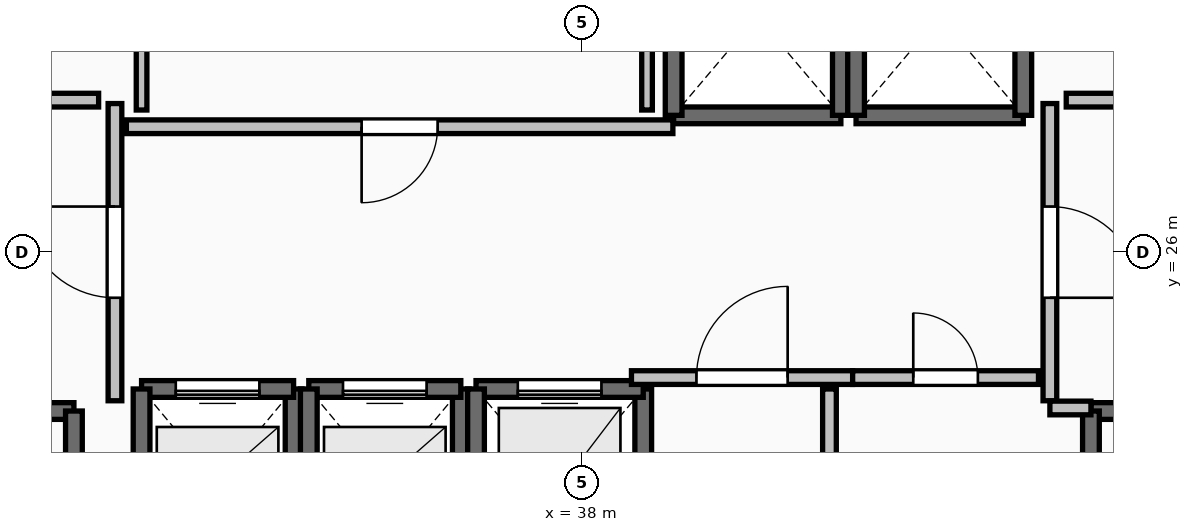
"""IFC4 building model, lengths in metres.
Left out: names, types, materials, properties, quantities, classifications, styles, units other than length and angle.
Written with IfcOpenShell. Run it as: python <this file> out.ifc"""

import sys

from ifc_helpers import new_model, si_unit, direction, frame, frame_2d, origin, place, context, subcontext, project, spatial, rectangle, extrude, element, fill, save


model = new_model("IFC4")
c1 = context("Model", 3, precision=1e-05, world=origin(), true_north=direction((0.0, 1.0)))
c2 = subcontext(c1, "Body", "Model", "MODEL_VIEW")
j1 = project(units=[si_unit("LENGTHUNIT", "METRE"), si_unit("PLANEANGLEUNIT", "RADIAN")], contexts=[c1])
p1 = place(None, origin())
s1 = spatial("IfcSite", under=j1, at=p1, CompositionType="ELEMENT")
p2 = place(p1, origin())
s2 = spatial("IfcBuilding", under=s1, at=p2, CompositionType="ELEMENT")
p3 = place(p2, frame((0.0, 0.0, 136.1)))
s3 = spatial("IfcBuildingStorey", under=s2, at=p3, CompositionType="ELEMENT", Elevation=136.1)
p4 = place(p3, frame((27.94, 23.91, 0.0), z_axis=(0.0, 0.0, 1.0), x_axis=(1.0, 0.0, 0.0)))
e1 = element("IfcWall", 1, at=p4, inside=s3, PredefinedType="SOLIDWALL", context=c2, shape_type="SweptSolid", body=[
    extrude(rectangle(XDim=3.37, YDim=0.22, at=frame_2d((1.685, 0.0))), origin(), (0.0, 0.0, 1.0), 3.24),
])
p5 = place(p4, frame((1.135, 0.0, 0.0)))
e2 = element("IfcOpeningElement", 2, at=p5, cuts=e1, PredefinedType="OPENING", context=c2, shape_type="SweptSolid", body=[
    extrude(rectangle(XDim=1.1, YDim=2.15, at=frame_2d((0.55, 1.075))), frame((0.0, 0.125, 0.0), z_axis=(0.0, -1.0, 0.0), x_axis=(1.0, 0.0, 0.0)), (0.0, 0.0, 1.0), 0.25),
])
p6 = place(p3, frame((31.31, 23.91, 0.0), z_axis=(0.0, 0.0, 1.0), x_axis=(0.0, -1.0, 0.0)))
e3 = element("IfcWall", 3, at=p6, inside=s3, PredefinedType="SOLIDWALL", context=c2, shape_type="SweptSolid", body=[
    extrude(rectangle(XDim=7.42, YDim=0.22, at=frame_2d((3.71, 0.0))), origin(), (0.0, 0.0, 1.0), 3.24),
])
p7 = place(p3, frame((44.69, 23.91, 0.0), z_axis=(0.0, 0.0, 1.0), x_axis=(1.0, 0.0, 0.0)))
e4 = element("IfcWall", 4, at=p7, inside=s3, PredefinedType="SOLIDWALL", context=c2, shape_type="SweptSolid", body=[
    extrude(rectangle(XDim=3.37, YDim=0.22, at=frame_2d((1.685, 0.0))), origin(), (0.0, 0.0, 1.0), 3.24),
])
p8 = place(p7, frame((1.135, 0.0, 0.0)))
e5 = element("IfcOpeningElement", 5, at=p8, cuts=e4, PredefinedType="OPENING", context=c2, shape_type="SweptSolid", body=[
    extrude(rectangle(XDim=1.1, YDim=2.15, at=frame_2d((0.55, 1.075))), frame((0.0, 0.125, 0.0), z_axis=(0.0, -1.0, 0.0), x_axis=(1.0, 0.0, 0.0)), (0.0, 0.0, 1.0), 0.25),
])
p9 = place(p3, frame((44.69, 16.49, 0.0), z_axis=(0.0, 0.0, 1.0), x_axis=(0.0, 1.0, 0.0)))
e6 = element("IfcWall", 6, at=p9, inside=s3, PredefinedType="SOLIDWALL", context=c2, shape_type="SweptSolid", body=[
    extrude(rectangle(XDim=7.42, YDim=0.22, at=frame_2d((3.71, 0.0))), origin(), (0.0, 0.0, 1.0), 3.24),
])
p10 = place(p3, frame((34.2, 21.8, 0.0), z_axis=(0.0, 0.0, 1.0), x_axis=(0.0, 1.0, 0.0)))
e7 = element("IfcWall", 7, at=p10, inside=s3, PredefinedType="SOLIDWALL", context=c2, shape_type="SweptSolid", body=[
    extrude(rectangle(XDim=2.4, YDim=0.22, at=frame_2d((1.2, 0.0))), origin(), (0.0, 0.0, 1.0), 3.24),
])
p11 = place(p3, frame((34.2, 24.2, 0.0), z_axis=(0.0, 0.0, 1.0), x_axis=(-1.0, 0.0, 0.0)))
e8 = element("IfcWall", 8, at=p11, inside=s3, PredefinedType="SOLIDWALL", context=c2, shape_type="SweptSolid", body=[
    extrude(rectangle(XDim=2.0, YDim=0.22, at=frame_2d((1.0, 0.0))), origin(), (0.0, 0.0, 1.0), 3.24),
])
p12 = place(p11, frame((0.45, 0.0, 0.0)))
e9 = element("IfcOpeningElement", 9, at=p12, cuts=e8, PredefinedType="OPENING", context=c2, shape_type="SweptSolid", body=[
    extrude(rectangle(XDim=1.1, YDim=2.2, at=frame_2d((0.55, 1.1))), frame((0.0, 0.125, 0.0), z_axis=(0.0, -1.0, 0.0), x_axis=(1.0, 0.0, 0.0)), (0.0, 0.0, 1.0), 0.25),
])
for number, where, z_axis, x_axis in (
    (10, (32.2, 24.2, 0.0), (0.0, 0.0, 1.0), (0.0, -1.0, 0.0)),
    (11, (36.4, 21.8, 0.0), (0.0, 0.0, 1.0), (0.0, 1.0, 0.0)),
):
    element("IfcWall", number, at=place(p3, frame(where, z_axis=z_axis, x_axis=x_axis)), inside=s3, PredefinedType="SOLIDWALL", context=c2, shape_type="SweptSolid", body=[
        extrude(rectangle(XDim=2.4, YDim=0.22, at=frame_2d((1.2, 0.0))), origin(), (0.0, 0.0, 1.0), 3.24),
    ])
p13 = place(p3, frame((36.4, 24.2, 0.0), z_axis=(0.0, 0.0, 1.0), x_axis=(-1.0, 0.0, 0.0)))
e12 = element("IfcWall", 12, at=p13, inside=s3, PredefinedType="SOLIDWALL", context=c2, shape_type="SweptSolid", body=[
    extrude(rectangle(XDim=2.0, YDim=0.22, at=frame_2d((1.0, 0.0))), origin(), (0.0, 0.0, 1.0), 3.24),
])
p14 = place(p13, frame((0.45, 0.0, 0.0)))
e13 = element("IfcOpeningElement", 13, at=p14, cuts=e12, PredefinedType="OPENING", context=c2, shape_type="SweptSolid", body=[
    extrude(rectangle(XDim=1.1, YDim=2.2, at=frame_2d((0.55, 1.1))), frame((0.0, 0.125, 0.0), z_axis=(0.0, -1.0, 0.0), x_axis=(1.0, 0.0, 0.0)), (0.0, 0.0, 1.0), 0.25),
])
p15 = place(p3, frame((34.4, 24.2, 0.0), z_axis=(0.0, 0.0, 1.0), x_axis=(0.0, -1.0, 0.0)))
e14 = element("IfcWall", 14, at=p15, inside=s3, PredefinedType="SOLIDWALL", context=c2, shape_type="SweptSolid", body=[
    extrude(rectangle(XDim=2.4, YDim=0.22, at=frame_2d((1.2, 0.0))), origin(), (0.0, 0.0, 1.0), 3.24),
])
p16 = place(p3, frame((38.8, 21.6, 0.0), z_axis=(0.0, 0.0, 1.0), x_axis=(0.0, 1.0, 0.0)))
e15 = element("IfcWall", 15, at=p16, inside=s3, PredefinedType="SOLIDWALL", context=c2, shape_type="SweptSolid", body=[
    extrude(rectangle(XDim=2.6, YDim=0.22, at=frame_2d((1.3, 0.0))), origin(), (0.0, 0.0, 1.0), 3.24),
])
p17 = place(p3, frame((38.8, 24.2, 0.0), z_axis=(0.0, 0.0, 1.0), x_axis=(-1.0, 0.0, 0.0)))
e16 = element("IfcWall", 16, at=p17, inside=s3, PredefinedType="SOLIDWALL", context=c2, shape_type="SweptSolid", body=[
    extrude(rectangle(XDim=2.2, YDim=0.22, at=frame_2d((1.1, 0.0))), origin(), (0.0, 0.0, 1.0), 3.24),
])
p18 = place(p17, frame((0.55, 0.0, 0.0)))
e17 = element("IfcOpeningElement", 17, at=p18, cuts=e16, PredefinedType="OPENING", context=c2, shape_type="SweptSolid", body=[
    extrude(rectangle(XDim=1.1, YDim=2.2, at=frame_2d((0.55, 1.1))), frame((0.0, 0.125, 0.0), z_axis=(0.0, -1.0, 0.0), x_axis=(1.0, 0.0, 0.0)), (0.0, 0.0, 1.0), 0.25),
])
p19 = place(p3, frame((36.6, 24.2, 0.0), z_axis=(0.0, 0.0, 1.0), x_axis=(0.0, -1.0, 0.0)))
e18 = element("IfcWall", 18, at=p19, inside=s3, PredefinedType="SOLIDWALL", context=c2, shape_type="SweptSolid", body=[
    extrude(rectangle(XDim=2.6, YDim=0.22, at=frame_2d((1.3, 0.0))), origin(), (0.0, 0.0, 1.0), 3.24),
])
p20 = place(p3, frame((39.2, 27.8, 0.0), z_axis=(0.0, 0.0, 1.0), x_axis=(1.0, 0.0, 0.0)))
e19 = element("IfcWall", 19, at=p20, inside=s3, PredefinedType="SOLIDWALL", context=c2, shape_type="SweptSolid", body=[
    extrude(rectangle(XDim=2.2, YDim=0.22, at=frame_2d((1.1, 0.0))), origin(), (0.0, 0.0, 1.0), 3.24),
])
for number, where, z_axis, x_axis in (
    (20, (41.4, 27.8, 0.0), (0.0, 0.0, 1.0), (0.0, 1.0, 0.0)),
    (21, (39.2, 30.4, 0.0), (0.0, 0.0, 1.0), (0.0, -1.0, 0.0)),
):
    element("IfcWall", number, at=place(p3, frame(where, z_axis=z_axis, x_axis=x_axis)), inside=s3, PredefinedType="SOLIDWALL", context=c2, shape_type="SweptSolid", body=[
        extrude(rectangle(XDim=2.6, YDim=0.22, at=frame_2d((1.3, 0.0))), origin(), (0.0, 0.0, 1.0), 3.24),
    ])
p21 = place(p3, frame((41.6, 27.8, 0.0), z_axis=(0.0, 0.0, 1.0), x_axis=(1.0, 0.0, 0.0)))
e22 = element("IfcWall", 22, at=p21, inside=s3, PredefinedType="SOLIDWALL", context=c2, shape_type="SweptSolid", body=[
    extrude(rectangle(XDim=2.2, YDim=0.22, at=frame_2d((1.1, 0.0))), origin(), (0.0, 0.0, 1.0), 3.24),
])
for number, where, z_axis, x_axis in (
    (23, (43.8, 27.8, 0.0), (0.0, 0.0, 1.0), (0.0, 1.0, 0.0)),
    (24, (41.6, 30.4, 0.0), (0.0, 0.0, 1.0), (0.0, -1.0, 0.0)),
):
    element("IfcWall", number, at=place(p3, frame(where, z_axis=z_axis, x_axis=x_axis)), inside=s3, PredefinedType="SOLIDWALL", context=c2, shape_type="SweptSolid", body=[
        extrude(rectangle(XDim=2.6, YDim=0.22, at=frame_2d((1.3, 0.0))), origin(), (0.0, 0.0, 1.0), 3.24),
    ])
p22 = place(p3, frame((31.85, 24.045, 0.0), z_axis=(0.0, 0.0, 1.0), x_axis=(0.0, 1.0, 0.0)))
e25 = element("IfcWall", 25, at=p22, inside=s3, PredefinedType="PARTITIONING", context=c2, shape_type="SweptSolid", body=[
    extrude(rectangle(XDim=3.91, YDim=0.18, at=frame_2d((1.955, 0.0))), origin(), (0.0, 0.0, 1.0), 3.24),
])
p23 = place(p22, frame((1.355, 0.0, 0.0)))
e26 = element("IfcOpeningElement", 26, at=p23, cuts=e25, PredefinedType="OPENING", context=c2, shape_type="SweptSolid", body=[
    extrude(rectangle(XDim=1.2, YDim=2.15, at=frame_2d((0.6, 1.075))), frame((0.0, 0.105, 0.0), z_axis=(0.0, -1.0, 0.0), x_axis=(1.0, 0.0, 0.0)), (0.0, 0.0, 1.0), 0.21),
])
p24 = place(p3, frame((44.15, 27.955, 0.0), z_axis=(0.0, 0.0, 1.0), x_axis=(0.0, -1.0, 0.0)))
e27 = element("IfcWall", 27, at=p24, inside=s3, PredefinedType="PARTITIONING", context=c2, shape_type="SweptSolid", body=[
    extrude(rectangle(XDim=3.91, YDim=0.18, at=frame_2d((1.955, 0.0))), origin(), (0.0, 0.0, 1.0), 3.24),
])
p25 = place(p24, frame((1.355, 0.0, 0.0)))
e28 = element("IfcOpeningElement", 28, at=p25, cuts=e27, PredefinedType="OPENING", context=c2, shape_type="SweptSolid", body=[
    extrude(rectangle(XDim=1.2, YDim=2.15, at=frame_2d((0.6, 1.075))), frame((0.0, 0.105, 0.0), z_axis=(0.0, -1.0, 0.0), x_axis=(1.0, 0.0, 0.0)), (0.0, 0.0, 1.0), 0.21),
])
p26 = place(p3, frame((44.15, 23.95, 0.0), z_axis=(0.0, 0.0, 1.0), x_axis=(1.0, 0.0, 0.0)))
e29 = element("IfcWall", 29, at=p26, inside=s3, PredefinedType="PARTITIONING", context=c2, shape_type="SweptSolid", body=[
    extrude(rectangle(XDim=0.54, YDim=0.18, at=frame_2d((0.27, 0.0))), origin(), (0.0, 0.0, 1.0), 3.24),
])
p27 = place(p3, frame((38.645, 24.35, 0.0), z_axis=(0.0, 0.0, 1.0), x_axis=(1.0, 0.0, 0.0)))
e30 = element("IfcWall", 30, at=p27, inside=s3, PredefinedType="PARTITIONING", context=c2, shape_type="SweptSolid", body=[
    extrude(rectangle(XDim=2.91, YDim=0.18, at=frame_2d((1.455, 0.0))), origin(), (0.0, 0.0, 1.0), 3.24),
])
p28 = place(p27, frame((0.855, 0.0, 0.0)))
e31 = element("IfcOpeningElement", 31, at=p28, cuts=e30, PredefinedType="OPENING", context=c2, shape_type="SweptSolid", body=[
    extrude(rectangle(XDim=1.2, YDim=2.15, at=frame_2d((0.6, 1.075))), frame((0.0, 0.105, 0.0), z_axis=(0.0, -1.0, 0.0), x_axis=(1.0, 0.0, 0.0)), (0.0, 0.0, 1.0), 0.21),
])
p29 = place(p3, frame((41.555, 24.35, 0.0), z_axis=(0.0, 0.0, 1.0), x_axis=(1.0, 0.0, 0.0)))
e32 = element("IfcWall", 32, at=p29, inside=s3, PredefinedType="PARTITIONING", context=c2, shape_type="SweptSolid", body=[
    extrude(rectangle(XDim=2.445, YDim=0.18, at=frame_2d((1.223, 0.0))), origin(), (0.0, 0.0, 1.0), 3.24),
])
p30 = place(p29, frame((0.798, 0.0, 0.0)))
e33 = element("IfcOpeningElement", 33, at=p30, cuts=e32, PredefinedType="OPENING", context=c2, shape_type="SweptSolid", body=[
    extrude(rectangle(XDim=0.85, YDim=2.1, at=frame_2d((0.425, 1.05))), frame((0.0, 0.105, 0.0), z_axis=(0.0, -1.0, 0.0), x_axis=(1.0, 0.0, 0.0)), (0.0, 0.0, 1.0), 0.21),
])
p31 = place(p3, frame((39.19, 27.65, 0.0), z_axis=(0.0, 0.0, 1.0), x_axis=(-1.0, 0.0, 0.0)))
e34 = element("IfcWall", 34, at=p31, inside=s3, PredefinedType="PARTITIONING", context=c2, shape_type="SweptSolid", body=[
    extrude(rectangle(XDim=7.19, YDim=0.18, at=frame_2d((3.595, 0.0))), origin(), (0.0, 0.0, 1.0), 3.24),
])
p32 = place(p31, frame((3.095, 0.0, 0.0)))
e35 = element("IfcOpeningElement", 35, at=p32, cuts=e34, PredefinedType="OPENING", context=c2, shape_type="SweptSolid", body=[
    extrude(rectangle(XDim=1.0, YDim=2.15, at=frame_2d((0.5, 1.075))), frame((0.0, 0.105, 0.0), z_axis=(0.0, -1.0, 0.0), x_axis=(1.0, 0.0, 0.0)), (0.0, 0.0, 1.0), 0.21),
])
p33 = place(p3, frame((41.25, 20.305, 0.0), z_axis=(0.0, 0.0, 1.0), x_axis=(0.0, 1.0, 0.0)))
e36 = element("IfcWall", 36, at=p33, inside=s3, PredefinedType="PARTITIONING", context=c2, shape_type="SweptSolid", body=[
    extrude(rectangle(XDim=3.895, YDim=0.18, at=frame_2d((1.948, 0.0))), origin(), (0.0, 0.0, 1.0), 3.24),
])
p34 = place(p33, frame((1.522, 0.0, 0.0)))
e37 = element("IfcOpeningElement", 37, at=p34, cuts=e36, PredefinedType="OPENING", context=c2, shape_type="SweptSolid", body=[
    extrude(rectangle(XDim=0.85, YDim=2.1, at=frame_2d((0.425, 1.05))), frame((0.0, 0.105, 0.0), z_axis=(0.0, -1.0, 0.0), x_axis=(1.0, 0.0, 0.0)), (0.0, 0.0, 1.0), 0.21),
])
for number, where, z_axis, x_axis in (
    (38, (31.635, 28.0, 0.0), (0.0, 0.0, 1.0), (-1.0, 0.0, 0.0)),
    (39, (45.28, 28.0, 0.0), (0.0, 0.0, 1.0), (-1.0, 0.0, 0.0)),
):
    element("IfcWall", number, at=place(p3, frame(where, z_axis=z_axis, x_axis=x_axis)), inside=s3, PredefinedType="PARTITIONING", context=c2, shape_type="SweptSolid", body=[
        extrude(rectangle(XDim=0.915, YDim=0.18, at=frame_2d((0.458, 0.0))), origin(), (0.0, 0.0, 1.0), 3.24),
    ])
for number, where, z_axis, x_axis in (
    (40, (32.2, 30.26, 0.0), (0.0, 0.0, 1.0), (0.0, -1.0, 0.0)),
    (41, (38.85, 27.87, 0.0), (0.0, 0.0, 1.0), (0.0, 1.0, 0.0)),
):
    element("IfcWall", number, at=place(p3, frame(where, z_axis=z_axis, x_axis=x_axis)), inside=s3, PredefinedType="PARTITIONING", context=c2, shape_type="SweptSolid", body=[
        extrude(rectangle(XDim=2.39, YDim=0.14, at=frame_2d((1.195, 0.0))), origin(), (0.0, 0.0, 1.0), 3.24),
    ])
p35 = place(p12, origin())
e42 = element("IfcDoor", 42, at=p35, inside=s3, OperationType="SLIDING_TO_LEFT", PredefinedType="DOOR", context=c2, shape_type="SweptSolid", body=[
    extrude(rectangle(XDim=1.1, YDim=2.2, at=frame_2d((0.55, 1.1))), frame((0.0, 0.025, 0.0), z_axis=(0.0, -1.0, 0.0), x_axis=(1.0, 0.0, 0.0)), (0.0, 0.0, 1.0), 0.05),
])
fill(e9, e42)
p36 = place(p14, origin())
e43 = element("IfcDoor", 43, at=p36, inside=s3, OperationType="SLIDING_TO_LEFT", PredefinedType="DOOR", context=c2, shape_type="SweptSolid", body=[
    extrude(rectangle(XDim=1.1, YDim=2.2, at=frame_2d((0.55, 1.1))), frame((0.0, 0.025, 0.0), z_axis=(0.0, -1.0, 0.0), x_axis=(1.0, 0.0, 0.0)), (0.0, 0.0, 1.0), 0.05),
])
fill(e13, e43)
p37 = place(p18, origin())
e44 = element("IfcDoor", 44, at=p37, inside=s3, OperationType="SLIDING_TO_LEFT", PredefinedType="DOOR", context=c2, shape_type="SweptSolid", body=[
    extrude(rectangle(XDim=1.1, YDim=2.2, at=frame_2d((0.55, 1.1))), frame((0.0, 0.025, 0.0), z_axis=(0.0, -1.0, 0.0), x_axis=(1.0, 0.0, 0.0)), (0.0, 0.0, 1.0), 0.05),
])
fill(e17, e44)
p38 = place(p23, origin())
e45 = element("IfcDoor", 45, at=p38, inside=s3, OperationType="SINGLE_SWING_RIGHT", PredefinedType="DOOR", context=c2, shape_type="SweptSolid", body=[
    extrude(rectangle(XDim=1.2, YDim=2.15, at=frame_2d((0.6, 1.075))), frame((0.0, 0.025, 0.0), z_axis=(0.0, -1.0, 0.0), x_axis=(1.0, 0.0, 0.0)), (0.0, 0.0, 1.0), 0.05),
])
fill(e26, e45)
p39 = place(p25, origin())
e46 = element("IfcDoor", 46, at=p39, inside=s3, OperationType="SINGLE_SWING_RIGHT", PredefinedType="DOOR", context=c2, shape_type="SweptSolid", body=[
    extrude(rectangle(XDim=1.2, YDim=2.15, at=frame_2d((0.6, 1.075))), frame((0.0, 0.025, 0.0), z_axis=(0.0, -1.0, 0.0), x_axis=(1.0, 0.0, 0.0)), (0.0, 0.0, 1.0), 0.05),
])
fill(e28, e46)
p40 = place(p28, origin())
e47 = element("IfcDoor", 47, at=p40, inside=s3, OperationType="SINGLE_SWING_RIGHT", PredefinedType="DOOR", context=c2, shape_type="SweptSolid", body=[
    extrude(rectangle(XDim=1.2, YDim=2.15, at=frame_2d((0.6, 1.075))), frame((0.0, 0.025, 0.0), z_axis=(0.0, -1.0, 0.0), x_axis=(1.0, 0.0, 0.0)), (0.0, 0.0, 1.0), 0.05),
])
fill(e31, e47)
p41 = place(p30, origin())
e48 = element("IfcDoor", 48, at=p41, inside=s3, OperationType="SINGLE_SWING_LEFT", PredefinedType="DOOR", context=c2, shape_type="SweptSolid", body=[
    extrude(rectangle(XDim=0.85, YDim=2.1, at=frame_2d((0.425, 1.05))), frame((0.0, 0.025, 0.0), z_axis=(0.0, -1.0, 0.0), x_axis=(1.0, 0.0, 0.0)), (0.0, 0.0, 1.0), 0.05),
])
fill(e33, e48)
p42 = place(p32, origin())
e49 = element("IfcDoor", 49, at=p42, inside=s3, OperationType="SINGLE_SWING_RIGHT", PredefinedType="DOOR", context=c2, shape_type="SweptSolid", body=[
    extrude(rectangle(XDim=1.0, YDim=2.15, at=frame_2d((0.5, 1.075))), frame((0.0, 0.025, 0.0), z_axis=(0.0, -1.0, 0.0), x_axis=(1.0, 0.0, 0.0)), (0.0, 0.0, 1.0), 0.05),
])
fill(e35, e49)
save(model, sys.argv[1])
